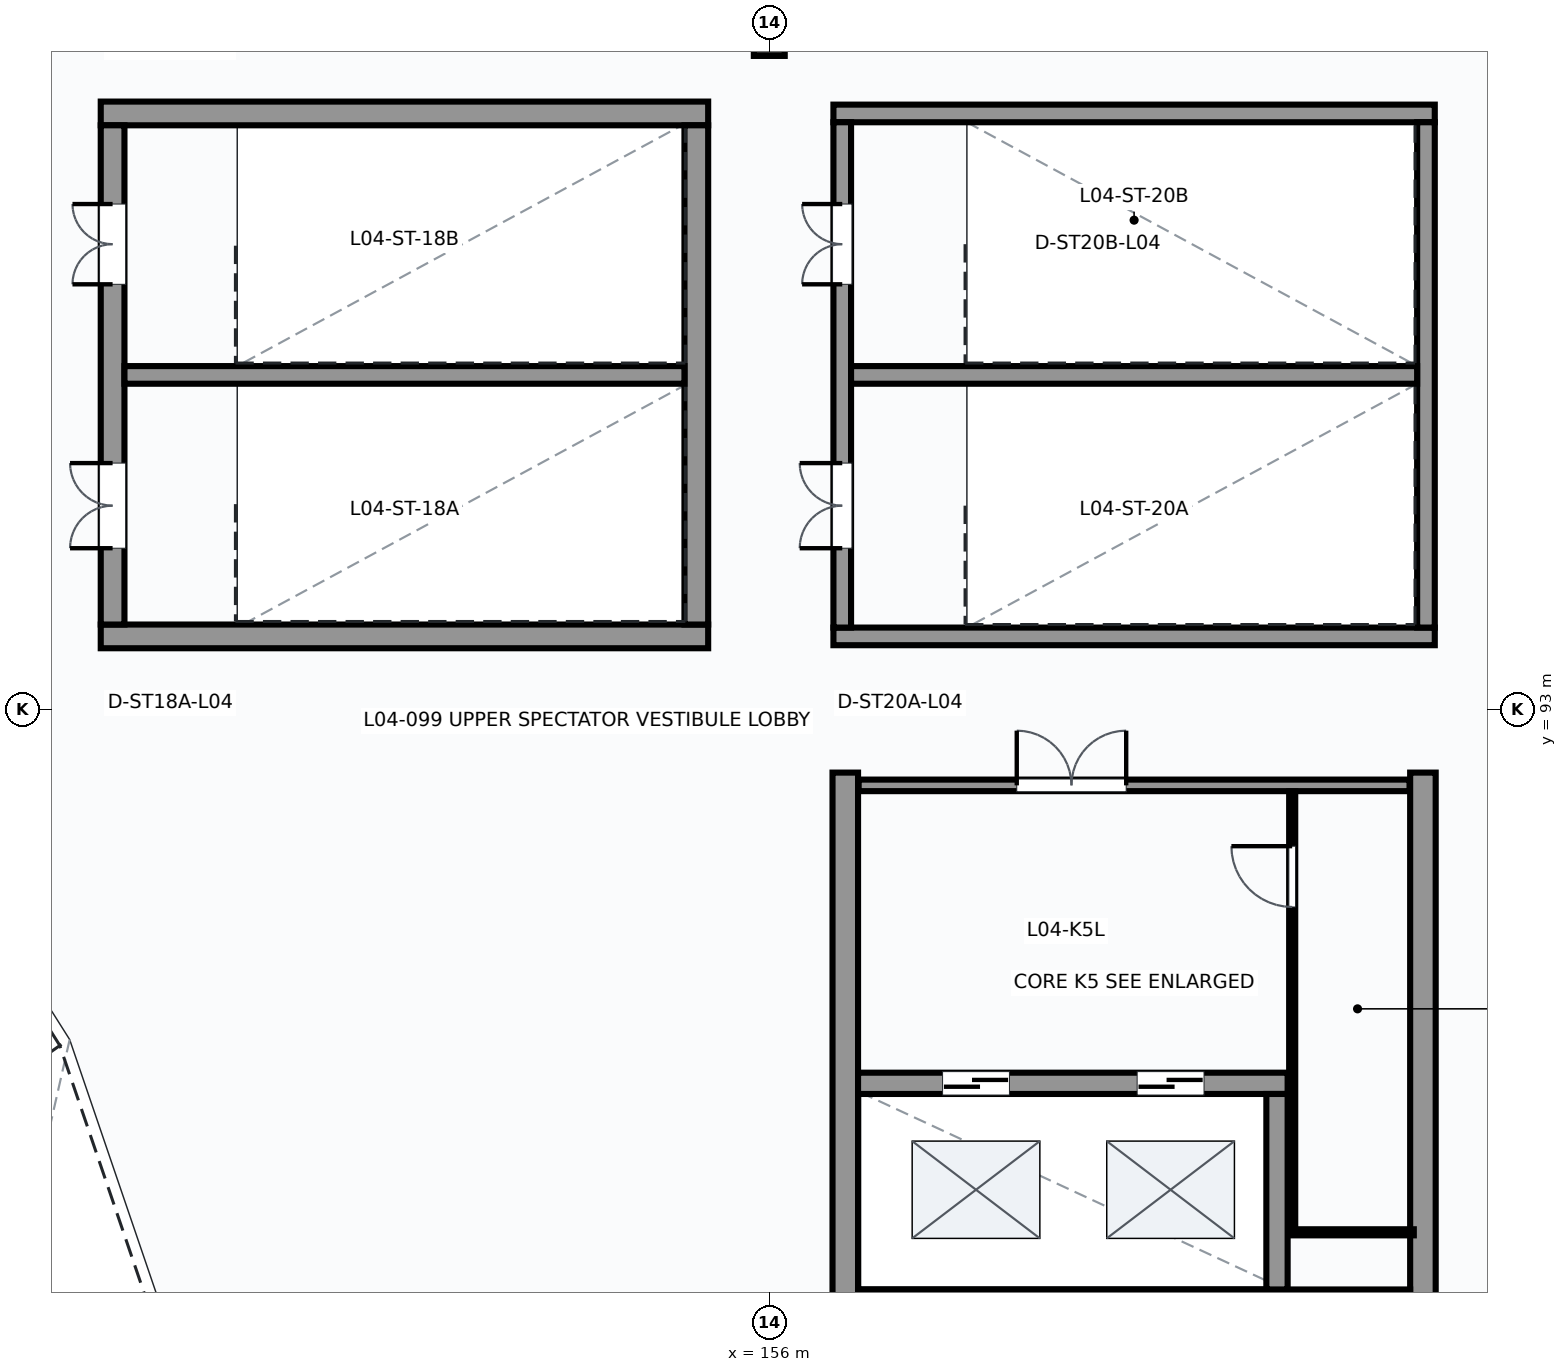
"""IFC4 building model, lengths in metres.
Left out: names, types, materials, properties, quantities, classifications, styles, units other than length and angle.
Written with IfcOpenShell. Run it as: python <this file> out.ifc"""

import sys

from ifc_helpers import new_model, si_unit, direction, frame, frame_2d, origin, origin_2d, place, context, subcontext, project, spatial, rectangle, hollow_circle, extrude, element, fill, save


model = new_model("IFC4")
c1 = context("Model", 3, precision=1e-05, world=origin(), true_north=direction((0.0, 1.0)))
c2 = subcontext(c1, "Body", "Model", "MODEL_VIEW")
j1 = project(units=[si_unit("LENGTHUNIT", "METRE"), si_unit("PLANEANGLEUNIT", "RADIAN")], contexts=[c1])
p1 = place(None, origin())
s1 = spatial("IfcSite", under=j1, at=p1, CompositionType="ELEMENT")
p2 = place(p1, origin())
s2 = spatial("IfcBuilding", under=s1, at=p2, CompositionType="ELEMENT")
p3 = place(p2, frame((0.0, 0.0, 19.2)))
s3 = spatial("IfcBuildingStorey", under=s2, at=p3, CompositionType="ELEMENT", Elevation=19.2)
p4 = place(p3, frame((156.0, 104.0, 0.0), z_axis=(0.0, 0.0, 1.0), x_axis=(1.0, 0.0, 0.0)))
e1 = element("IfcColumn", 1, at=p4, inside=s3, PredefinedType="COLUMN", context=c2, shape_type="SweptSolid", body=[
    extrude(hollow_circle(Radius=0.254, WallThickness=0.02, at=origin_2d()), origin(), (0.0, 0.0, 1.0), 5.4),
])
for number, where, z_axis, x_axis in (
    (2, (145.005, 94.2, 0.0), (0.0, 0.0, 1.0), (1.0, 0.0, 0.0)),
    (3, (145.005, 102.8, 0.0), (0.0, 0.0, 1.0), (1.0, 0.0, 0.0)),
):
    element("IfcWall", number, at=place(p3, frame(where, z_axis=z_axis, x_axis=x_axis)), inside=s3, PredefinedType="SHEAR", context=c2, shape_type="SweptSolid", body=[
        extrude(rectangle(XDim=9.99, YDim=0.39, at=frame_2d((4.995, 0.0))), origin(), (0.0, 0.0, 1.0), 5.4),
    ])
p5 = place(p3, frame((145.2, 94.395, 0.0), z_axis=(0.0, 0.0, 1.0), x_axis=(0.0, 1.0, 0.0)))
e4 = element("IfcWall", 4, at=p5, inside=s3, PredefinedType="SHEAR", context=c2, shape_type="SweptSolid", body=[
    extrude(rectangle(XDim=8.21, YDim=0.39, at=frame_2d((4.105, 0.0))), origin(), (0.0, 0.0, 1.0), 5.4),
])
p6 = place(p5, frame((1.255, 0.0, 0.0)))
e5 = element("IfcOpeningElement", 5, at=p6, cuts=e4, PredefinedType="OPENING", context=c2, shape_type="SweptSolid", body=[
    extrude(rectangle(XDim=1.4, YDim=2.2, at=frame_2d((0.7, 1.1))), frame((0.0, 0.205, 0.0), z_axis=(0.0, -1.0, 0.0), x_axis=(1.0, 0.0, 0.0)), (0.0, 0.0, 1.0), 0.41),
])
p7 = place(p5, frame((5.595, 0.0, 0.0)))
e6 = element("IfcOpeningElement", 6, at=p7, cuts=e4, PredefinedType="OPENING", context=c2, shape_type="SweptSolid", body=[
    extrude(rectangle(XDim=1.32, YDim=2.2, at=frame_2d((0.66, 1.1))), frame((0.0, 0.205, 0.0), z_axis=(0.0, -1.0, 0.0), x_axis=(1.0, 0.0, 0.0)), (0.0, 0.0, 1.0), 0.41),
])
p8 = place(p3, frame((154.8, 94.395, 0.0), z_axis=(0.0, 0.0, 1.0), x_axis=(0.0, 1.0, 0.0)))
e7 = element("IfcWall", 7, at=p8, inside=s3, PredefinedType="SHEAR", context=c2, shape_type="SweptSolid", body=[
    extrude(rectangle(XDim=8.21, YDim=0.39, at=frame_2d((4.105, 0.0))), origin(), (0.0, 0.0, 1.0), 5.4),
])
p9 = place(p3, frame((145.395, 98.5, 0.0), z_axis=(0.0, 0.0, 1.0), x_axis=(1.0, 0.0, 0.0)))
e8 = element("IfcWall", 8, at=p9, inside=s3, PredefinedType="SHEAR", context=c2, shape_type="SweptSolid", body=[
    extrude(rectangle(XDim=9.21, YDim=0.29, at=frame_2d((4.605, 0.0))), origin(), (0.0, 0.0, 1.0), 5.4),
])
for number, where, z_axis, x_axis in (
    (9, (157.055, 94.2, 0.0), (0.0, 0.0, 1.0), (1.0, 0.0, 0.0)),
    (10, (157.055, 102.8, 0.0), (0.0, 0.0, 1.0), (1.0, 0.0, 0.0)),
):
    element("IfcWall", number, at=place(p3, frame(where, z_axis=z_axis, x_axis=x_axis)), inside=s3, PredefinedType="SHEAR", context=c2, shape_type="SweptSolid", body=[
        extrude(rectangle(XDim=9.89, YDim=0.29, at=frame_2d((4.945, 0.0))), origin(), (0.0, 0.0, 1.0), 5.4),
    ])
p10 = place(p3, frame((157.2, 94.345, 0.0), z_axis=(0.0, 0.0, 1.0), x_axis=(0.0, 1.0, 0.0)))
e11 = element("IfcWall", 11, at=p10, inside=s3, PredefinedType="SHEAR", context=c2, shape_type="SweptSolid", body=[
    extrude(rectangle(XDim=8.31, YDim=0.29, at=frame_2d((4.155, 0.0))), origin(), (0.0, 0.0, 1.0), 5.4),
])
p11 = place(p10, frame((1.305, 0.0, 0.0)))
e12 = element("IfcOpeningElement", 12, at=p11, cuts=e11, PredefinedType="OPENING", context=c2, shape_type="SweptSolid", body=[
    extrude(rectangle(XDim=1.4, YDim=2.2, at=frame_2d((0.7, 1.1))), frame((0.0, 0.155, 0.0), z_axis=(0.0, -1.0, 0.0), x_axis=(1.0, 0.0, 0.0)), (0.0, 0.0, 1.0), 0.31),
])
p12 = place(p10, frame((5.645, 0.0, 0.0)))
e13 = element("IfcOpeningElement", 13, at=p12, cuts=e11, PredefinedType="OPENING", context=c2, shape_type="SweptSolid", body=[
    extrude(rectangle(XDim=1.32, YDim=2.2, at=frame_2d((0.66, 1.1))), frame((0.0, 0.155, 0.0), z_axis=(0.0, -1.0, 0.0), x_axis=(1.0, 0.0, 0.0)), (0.0, 0.0, 1.0), 0.31),
])
p13 = place(p3, frame((166.8, 94.345, 0.0), z_axis=(0.0, 0.0, 1.0), x_axis=(0.0, 1.0, 0.0)))
e14 = element("IfcWall", 14, at=p13, inside=s3, PredefinedType="SHEAR", context=c2, shape_type="SweptSolid", body=[
    extrude(rectangle(XDim=8.31, YDim=0.29, at=frame_2d((4.155, 0.0))), origin(), (0.0, 0.0, 1.0), 5.4),
])
p14 = place(p3, frame((157.345, 98.5, 0.0), z_axis=(0.0, 0.0, 1.0), x_axis=(1.0, 0.0, 0.0)))
e15 = element("IfcWall", 15, at=p14, inside=s3, PredefinedType="SHEAR", context=c2, shape_type="SweptSolid", body=[
    extrude(rectangle(XDim=9.31, YDim=0.29, at=frame_2d((4.655, 0.0))), origin(), (0.0, 0.0, 1.0), 5.4),
])
for number, where, z_axis, x_axis in (
    (16, (157.25, 83.04, 0.0), (0.0, 0.0, 1.0), (0.0, 1.0, 0.0)),
    (17, (166.75, 83.04, 0.0), (0.0, 0.0, 1.0), (0.0, 1.0, 0.0)),
):
    element("IfcWall", number, at=place(p3, frame(where, z_axis=z_axis, x_axis=x_axis)), inside=s3, PredefinedType="SHEAR", context=c2, shape_type="SweptSolid", body=[
        extrude(rectangle(XDim=8.92, YDim=0.42, at=frame_2d((4.46, 0.0))), origin(), (0.0, 0.0, 1.0), 5.4),
    ])
p15 = place(p3, frame((157.46, 83.25, 0.0), z_axis=(0.0, 0.0, 1.0), x_axis=(1.0, 0.0, 0.0)))
e18 = element("IfcWall", 18, at=p15, inside=s3, PredefinedType="SHEAR", context=c2, shape_type="SweptSolid", body=[
    extrude(rectangle(XDim=9.08, YDim=0.42, at=frame_2d((4.54, 0.0))), origin(), (0.0, 0.0, 1.0), 5.4),
])
p16 = place(p3, frame((157.46, 86.85, 0.0), z_axis=(0.0, 0.0, 1.0), x_axis=(1.0, 0.0, 0.0)))
e19 = element("IfcWall", 19, at=p16, inside=s3, PredefinedType="SHEAR", context=c2, shape_type="SweptSolid", body=[
    extrude(rectangle(XDim=7.065, YDim=0.35, at=frame_2d((3.532, 0.0))), origin(), (0.0, 0.0, 1.0), 5.4),
])
p17 = place(p16, frame((1.39, 0.0, 0.0)))
e20 = element("IfcOpeningElement", 20, at=p17, cuts=e19, PredefinedType="OPENING", context=c2, shape_type="SweptSolid", body=[
    extrude(rectangle(XDim=1.1, YDim=2.2, at=frame_2d((0.55, 1.1))), frame((0.0, 0.185, 0.0), z_axis=(0.0, -1.0, 0.0), x_axis=(1.0, 0.0, 0.0)), (0.0, 0.0, 1.0), 0.37),
])
p18 = place(p16, frame((4.59, 0.0, 0.0)))
e21 = element("IfcOpeningElement", 21, at=p18, cuts=e19, PredefinedType="OPENING", context=c2, shape_type="SweptSolid", body=[
    extrude(rectangle(XDim=1.1, YDim=2.2, at=frame_2d((0.55, 1.1))), frame((0.0, 0.185, 0.0), z_axis=(0.0, -1.0, 0.0), x_axis=(1.0, 0.0, 0.0)), (0.0, 0.0, 1.0), 0.37),
])
p19 = place(p3, frame((164.35, 83.46, 0.0), z_axis=(0.0, 0.0, 1.0), x_axis=(0.0, 1.0, 0.0)))
e22 = element("IfcWall", 22, at=p19, inside=s3, PredefinedType="SHEAR", context=c2, shape_type="SweptSolid", body=[
    extrude(rectangle(XDim=3.215, YDim=0.35, at=frame_2d((1.607, 0.0))), origin(), (0.0, 0.0, 1.0), 5.4),
])
p20 = place(p3, frame((157.47, 91.75, 0.0), z_axis=(0.0, 0.0, 1.0), x_axis=(1.0, 0.0, 0.0)))
e23 = element("IfcWall", 23, at=p20, inside=s3, PredefinedType="PARTITIONING", context=c2, shape_type="SweptSolid", body=[
    extrude(rectangle(XDim=9.06, YDim=0.19, at=frame_2d((4.53, 0.0))), origin(), (0.0, 0.0, 1.0), 5.07),
])
p21 = place(p20, frame((2.6, 0.0, 0.0)))
e24 = element("IfcOpeningElement", 24, at=p21, cuts=e23, PredefinedType="OPENING", context=c2, shape_type="SweptSolid", body=[
    extrude(rectangle(XDim=1.8, YDim=2.3, at=frame_2d((0.9, 1.15))), frame((0.0, 0.105, 0.0), z_axis=(0.0, -1.0, 0.0), x_axis=(1.0, 0.0, 0.0)), (0.0, 0.0, 1.0), 0.21),
])
p22 = place(p3, frame((164.6, 84.4, 0.0), z_axis=(0.0, 0.0, 1.0), x_axis=(0.0, 1.0, 0.0)))
e25 = element("IfcWall", 25, at=p22, inside=s3, PredefinedType="PARTITIONING", context=c2, shape_type="SweptSolid", body=[
    extrude(rectangle(XDim=7.25, YDim=0.1, at=frame_2d((3.625, 0.0))), origin(), (0.0, 0.0, 1.0), 5.07),
])
p23 = place(p22, frame((5.35, 0.0, 0.0)))
e26 = element("IfcOpeningElement", 26, at=p23, cuts=e25, PredefinedType="OPENING", context=c2, shape_type="SweptSolid", body=[
    extrude(rectangle(XDim=1.0, YDim=2.1, at=frame_2d((0.5, 1.05))), frame((0.0, 0.06, 0.0), z_axis=(0.0, -1.0, 0.0), x_axis=(1.0, 0.0, 0.0)), (0.0, 0.0, 1.0), 0.12),
])
p24 = place(p3, frame((164.6, 84.4, 0.0), z_axis=(0.0, 0.0, 1.0), x_axis=(1.0, 0.0, 0.0)))
e27 = element("IfcWall", 27, at=p24, inside=s3, PredefinedType="PARTITIONING", context=c2, shape_type="SweptSolid", body=[
    extrude(rectangle(XDim=2.0, YDim=0.1, at=frame_2d((1.0, 0.0))), origin(), (0.0, 0.0, 1.0), 5.07),
])
p25 = place(p6, origin())
e28 = element("IfcDoor", 28, at=p25, inside=s3, OperationType="DOUBLE_DOOR_SINGLE_SWING", PredefinedType="DOOR", context=c2, shape_type="SweptSolid", body=[
    extrude(rectangle(XDim=1.4, YDim=2.2, at=frame_2d((0.7, 1.1))), frame((0.0, 0.025, 0.0), z_axis=(0.0, -1.0, 0.0), x_axis=(1.0, 0.0, 0.0)), (0.0, 0.0, 1.0), 0.05),
])
fill(e5, e28)
p26 = place(p7, origin())
e29 = element("IfcDoor", 29, at=p26, inside=s3, OperationType="DOUBLE_DOOR_SINGLE_SWING", PredefinedType="DOOR", context=c2, shape_type="SweptSolid", body=[
    extrude(rectangle(XDim=1.32, YDim=2.2, at=frame_2d((0.66, 1.1))), frame((0.0, 0.025, 0.0), z_axis=(0.0, -1.0, 0.0), x_axis=(1.0, 0.0, 0.0)), (0.0, 0.0, 1.0), 0.05),
])
fill(e6, e29)
p27 = place(p11, origin())
e30 = element("IfcDoor", 30, at=p27, inside=s3, OperationType="DOUBLE_DOOR_SINGLE_SWING", PredefinedType="DOOR", context=c2, shape_type="SweptSolid", body=[
    extrude(rectangle(XDim=1.4, YDim=2.2, at=frame_2d((0.7, 1.1))), frame((0.0, 0.025, 0.0), z_axis=(0.0, -1.0, 0.0), x_axis=(1.0, 0.0, 0.0)), (0.0, 0.0, 1.0), 0.05),
])
fill(e12, e30)
p28 = place(p12, origin())
e31 = element("IfcDoor", 31, at=p28, inside=s3, OperationType="DOUBLE_DOOR_SINGLE_SWING", PredefinedType="DOOR", context=c2, shape_type="SweptSolid", body=[
    extrude(rectangle(XDim=1.32, YDim=2.2, at=frame_2d((0.66, 1.1))), frame((0.0, 0.025, 0.0), z_axis=(0.0, -1.0, 0.0), x_axis=(1.0, 0.0, 0.0)), (0.0, 0.0, 1.0), 0.05),
])
fill(e13, e31)
p29 = place(p17, origin())
e32 = element("IfcDoor", 32, at=p29, inside=s3, OperationType="SLIDING_TO_LEFT", PredefinedType="DOOR", context=c2, shape_type="SweptSolid", body=[
    extrude(rectangle(XDim=1.1, YDim=2.2, at=frame_2d((0.55, 1.1))), frame((0.0, 0.025, 0.0), z_axis=(0.0, -1.0, 0.0), x_axis=(1.0, 0.0, 0.0)), (0.0, 0.0, 1.0), 0.05),
])
fill(e20, e32)
p30 = place(p18, origin())
e33 = element("IfcDoor", 33, at=p30, inside=s3, OperationType="SLIDING_TO_LEFT", PredefinedType="DOOR", context=c2, shape_type="SweptSolid", body=[
    extrude(rectangle(XDim=1.1, YDim=2.2, at=frame_2d((0.55, 1.1))), frame((0.0, 0.025, 0.0), z_axis=(0.0, -1.0, 0.0), x_axis=(1.0, 0.0, 0.0)), (0.0, 0.0, 1.0), 0.05),
])
fill(e21, e33)
p31 = place(p21, origin())
e34 = element("IfcDoor", 34, at=p31, inside=s3, OperationType="DOUBLE_DOOR_SINGLE_SWING", PredefinedType="DOOR", context=c2, shape_type="SweptSolid", body=[
    extrude(rectangle(XDim=1.8, YDim=2.3, at=frame_2d((0.9, 1.15))), frame((0.0, 0.025, 0.0), z_axis=(0.0, -1.0, 0.0), x_axis=(1.0, 0.0, 0.0)), (0.0, 0.0, 1.0), 0.05),
])
fill(e24, e34)
p32 = place(p23, origin())
e35 = element("IfcDoor", 35, at=p32, inside=s3, OperationType="SINGLE_SWING_RIGHT", PredefinedType="DOOR", context=c2, shape_type="SweptSolid", body=[
    extrude(rectangle(XDim=1.0, YDim=2.1, at=frame_2d((0.5, 1.05))), frame((0.0, 0.025, 0.0), z_axis=(0.0, -1.0, 0.0), x_axis=(1.0, 0.0, 0.0)), (0.0, 0.0, 1.0), 0.05),
])
fill(e26, e35)
save(model, sys.argv[1])
